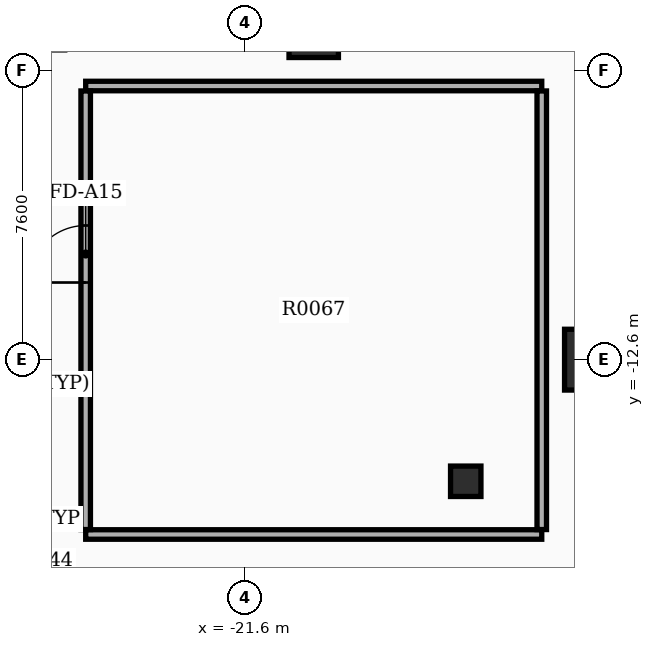
"""IFC4 building model, lengths in metres.
Left out: names, types, materials, properties, quantities, classifications, styles, units other than length and angle.
Written with IfcOpenShell. Run it as: python <this file> out.ifc"""

import sys

from ifc_helpers import new_model, si_unit, direction, frame, frame_2d, origin, origin_2d, place, context, subcontext, project, spatial, rectangle, extrude, element, fill, save


model = new_model("IFC4")
c1 = context("Model", 3, precision=1e-05, world=origin(), true_north=direction((0.0, 1.0)))
c2 = subcontext(c1, "Body", "Model", "MODEL_VIEW")
j1 = project(units=[si_unit("LENGTHUNIT", "METRE"), si_unit("PLANEANGLEUNIT", "RADIAN")], contexts=[c1])
p1 = place(None, origin())
s1 = spatial("IfcSite", under=j1, at=p1, CompositionType="ELEMENT")
p2 = place(p1, origin())
s2 = spatial("IfcBuilding", under=s1, at=p2, CompositionType="ELEMENT")
p3 = place(p2, frame((0.0, 0.0, -5.2)))
s3 = spatial("IfcBuildingStorey", under=s2, at=p3, CompositionType="ELEMENT", Elevation=-5.2)
p4 = place(p3, frame((-15.8, -15.8, 0.0), z_axis=(0.0, 0.0, 1.0), x_axis=(1.0, 0.0, 0.0)))
e1 = element("IfcColumn", 1, at=p4, inside=s3, PredefinedType="COLUMN", context=c2, shape_type="SweptSolid", body=[
    extrude(rectangle(XDim=0.8, YDim=0.8, at=origin_2d()), origin(), (0.0, 0.0, 1.0), 5.2),
])
p5 = place(p3, frame((-12.4, -12.6, 0.0), z_axis=(0.0, 0.0, 1.0), x_axis=(1.0, 0.0, 0.0)))
e2 = element("IfcColumn", 2, at=p5, inside=s3, PredefinedType="COLUMN", context=c2, shape_type="SweptSolid", body=[
    extrude(rectangle(XDim=1.6, YDim=1.6, at=origin_2d()), origin(), (0.0, 0.0, 1.0), 5.2),
])
p6 = place(p3, frame((-19.8, -4.0, 0.0), z_axis=(0.0, 0.0, 1.0), x_axis=(1.0, 0.0, 0.0)))
e3 = element("IfcColumn", 3, at=p6, inside=s3, PredefinedType="COLUMN", context=c2, shape_type="SweptSolid", body=[
    extrude(rectangle(XDim=1.3, YDim=1.3, at=origin_2d()), origin(), (0.0, 0.0, 1.0), 5.2),
])
p7 = place(p3, frame((-33.15, -16.8, 0.0), z_axis=(0.0, 0.0, 1.0), x_axis=(1.0, 0.0, 0.0)))
e4 = element("IfcWall", 4, at=p7, inside=s3, PredefinedType="SOLIDWALL", context=c2, shape_type="SweptSolid", body=[
    extrude(rectangle(XDim=7.3, YDim=0.3, at=frame_2d((3.65, 0.0))), origin(), (0.0, 0.0, 1.0), 3.97),
])
p8 = place(p7, frame((0.6, 0.0, 0.0)))
e5 = element("IfcOpeningElement", 5, at=p8, cuts=e4, PredefinedType="OPENING", context=c2, shape_type="SweptSolid", body=[
    extrude(rectangle(XDim=4.4, YDim=2.4, at=frame_2d((2.2, 1.2))), frame((0.0, 0.16, 0.0), z_axis=(0.0, -1.0, 0.0), x_axis=(1.0, 0.0, 0.0)), (0.0, 0.0, 1.0), 0.32),
])
for number, where, z_axis, x_axis in (
    (6, (-25.8, -17.2, 0.0), (0.0, 0.0, 1.0), (1.0, 0.0, 0.0)),
    (7, (-25.8, -5.4, 0.0), (0.0, 0.0, 1.0), (1.0, 0.0, 0.0)),
):
    element("IfcWall", number, at=place(p3, frame(where, z_axis=z_axis, x_axis=x_axis)), inside=s3, PredefinedType="SOLIDWALL", context=c2, shape_type="SweptSolid", body=[
        extrude(rectangle(XDim=12.0, YDim=0.25, at=frame_2d((6.0, 0.0))), origin(), (0.0, 0.0, 1.0), 3.97),
    ])
p9 = place(p3, frame((-25.8, -17.07, 0.0), z_axis=(0.0, 0.0, 1.0), x_axis=(0.0, 1.0, 0.0)))
e8 = element("IfcWall", 8, at=p9, inside=s3, PredefinedType="SOLIDWALL", context=c2, shape_type="SweptSolid", body=[
    extrude(rectangle(XDim=11.54, YDim=0.25, at=frame_2d((5.77, 0.0))), origin(), (0.0, 0.0, 1.0), 3.97),
])
p10 = place(p9, frame((6.5, 0.0, 0.0)))
e9 = element("IfcOpeningElement", 9, at=p10, cuts=e8, PredefinedType="OPENING", context=c2, shape_type="SweptSolid", body=[
    extrude(rectangle(XDim=1.5, YDim=2.15, at=frame_2d((0.75, 1.075))), frame((0.0, 0.135, 0.0), z_axis=(0.0, -1.0, 0.0), x_axis=(1.0, 0.0, 0.0)), (0.0, 0.0, 1.0), 0.27),
])
p11 = place(p3, frame((-13.8, -17.07, 0.0), z_axis=(0.0, 0.0, 1.0), x_axis=(0.0, 1.0, 0.0)))
e10 = element("IfcWall", 10, at=p11, inside=s3, PredefinedType="SOLIDWALL", context=c2, shape_type="SweptSolid", body=[
    extrude(rectangle(XDim=11.54, YDim=0.25, at=frame_2d((5.77, 0.0))), origin(), (0.0, 0.0, 1.0), 3.97),
])
p12 = place(p10, origin())
e11 = element("IfcDoor", 11, at=p12, inside=s3, OperationType="DOUBLE_DOOR_SINGLE_SWING", PredefinedType="DOOR", context=c2, shape_type="SweptSolid", body=[
    extrude(rectangle(XDim=1.5, YDim=2.15, at=frame_2d((0.75, 1.075))), frame((0.0, 0.025, 0.0), z_axis=(0.0, -1.0, 0.0), x_axis=(1.0, 0.0, 0.0)), (0.0, 0.0, 1.0), 0.05),
])
fill(e9, e11)
save(model, sys.argv[1])
